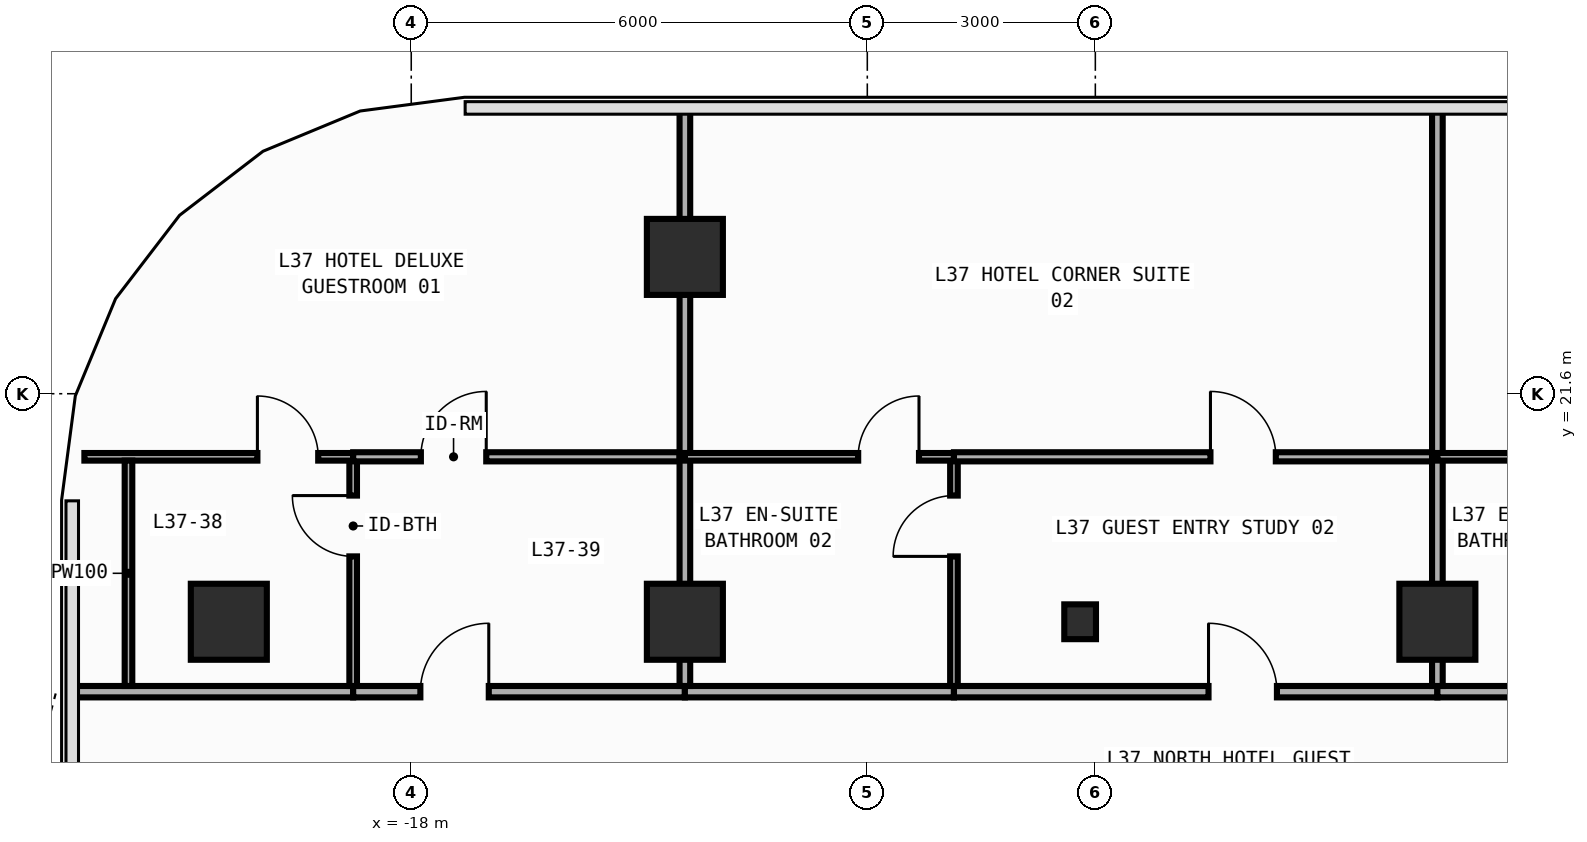
"""IFC4 building model, lengths in metres.
Left out: names, types, materials, properties, quantities, classifications, styles, units other than length and angle.
Written with IfcOpenShell. Run it as: python <this file> out.ifc"""

import sys

from ifc_helpers import new_model, si_unit, direction, frame, frame_2d, origin, origin_2d, place, context, subcontext, project, spatial, rectangle, i_section, extrude, element, fill, save


model = new_model("IFC4")
c1 = context("Model", 3, precision=1e-05, world=origin(), true_north=direction((0.0, 1.0)))
c2 = subcontext(c1, "Body", "Model", "MODEL_VIEW")
j1 = project(units=[si_unit("LENGTHUNIT", "METRE"), si_unit("PLANEANGLEUNIT", "RADIAN")], contexts=[c1])
p1 = place(None, origin())
s1 = spatial("IfcSite", under=j1, at=p1, CompositionType="ELEMENT")
p2 = place(p1, origin())
s2 = spatial("IfcBuilding", under=s1, at=p2, CompositionType="ELEMENT")
p3 = place(p2, frame((0.0, 0.0, 165.0)))
s3 = spatial("IfcBuildingStorey", under=s2, at=p3, CompositionType="ELEMENT", Elevation=165.0)
p4 = place(p3, frame((-9.2, 18.6, 0.0), z_axis=(0.0, 0.0, 1.0), x_axis=(1.0, 0.0, 0.0)))
e1 = element("IfcColumn", 1, at=p4, inside=s3, PredefinedType="COLUMN", context=c2, shape_type="SweptSolid", body=[
    extrude(i_section(OverallWidth=0.417, OverallDepth=0.458, WebThickness=0.03, FlangeThickness=0.05, FilletRadius=0.022, at=origin_2d()), origin(), (0.0, 0.0, 1.0), 3.8),
])
for number, where, z_axis, x_axis in (
    (2, (-20.4, 18.6, 0.0), (0.0, 0.0, 1.0), (1.0, 0.0, 0.0)),
    (3, (-14.4, 18.6, 0.0), (0.0, 0.0, 1.0), (1.0, 0.0, 0.0)),
    (4, (-4.5, 18.6, 0.0), (0.0, 0.0, 1.0), (1.0, 0.0, 0.0)),
    (5, (-14.4, 23.4, 0.0), (0.0, 0.0, 1.0), (1.0, 0.0, 0.0)),
):
    element("IfcColumn", number, at=place(p3, frame(where, z_axis=z_axis, x_axis=x_axis)), inside=s3, PredefinedType="COLUMN", context=c2, shape_type="SweptSolid", body=[
        extrude(rectangle(XDim=1.0, YDim=1.0, at=origin_2d()), origin(), (0.0, 0.0, 1.0), 3.8),
    ])
p5 = place(p3, frame((-22.455, 17.68, 0.0), z_axis=(0.0, 0.0, 1.0), x_axis=(1.0, 0.0, 0.0)))
e6 = element("IfcWall", 6, at=p5, inside=s3, PredefinedType="PARTITIONING", context=c2, shape_type="SweptSolid", body=[
    extrude(rectangle(XDim=3.691, YDim=0.15, at=frame_2d((1.846, 0.0))), origin(), (0.0, 0.0, 1.0), 3.54),
])
p6 = place(p3, frame((-18.764, 17.68, 0.0), z_axis=(0.0, 0.0, 1.0), x_axis=(1.0, 0.0, 0.0)))
e7 = element("IfcWall", 7, at=p6, inside=s3, PredefinedType="PARTITIONING", context=c2, shape_type="SweptSolid", body=[
    extrude(rectangle(XDim=4.364, YDim=0.15, at=frame_2d((2.182, 0.0))), origin(), (0.0, 0.0, 1.0), 3.54),
])
p7 = place(p6, frame((0.884, 0.0, 0.0)))
e8 = element("IfcOpeningElement", 8, at=p7, cuts=e7, PredefinedType="OPENING", context=c2, shape_type="SweptSolid", body=[
    extrude(rectangle(XDim=0.9, YDim=2.15, at=frame_2d((0.45, 1.075))), frame((0.0, 0.085, 0.0), z_axis=(0.0, -1.0, 0.0), x_axis=(1.0, 0.0, 0.0)), (0.0, 0.0, 1.0), 0.17),
])
p8 = place(p3, frame((-14.4, 17.68, 0.0), z_axis=(0.0, 0.0, 1.0), x_axis=(1.0, 0.0, 0.0)))
e9 = element("IfcWall", 9, at=p8, inside=s3, PredefinedType="PARTITIONING", context=c2, shape_type="SweptSolid", body=[
    extrude(rectangle(XDim=3.54, YDim=0.15, at=frame_2d((1.77, 0.0))), origin(), (0.0, 0.0, 1.0), 3.54),
])
p9 = place(p3, frame((-10.86, 17.68, 0.0), z_axis=(0.0, 0.0, 1.0), x_axis=(1.0, 0.0, 0.0)))
e10 = element("IfcWall", 10, at=p9, inside=s3, PredefinedType="PARTITIONING", context=c2, shape_type="SweptSolid", body=[
    extrude(rectangle(XDim=6.36, YDim=0.15, at=frame_2d((3.18, 0.0))), origin(), (0.0, 0.0, 1.0), 3.54),
])
p10 = place(p9, frame((3.349, 0.0, 0.0)))
e11 = element("IfcOpeningElement", 11, at=p10, cuts=e10, PredefinedType="OPENING", context=c2, shape_type="SweptSolid", body=[
    extrude(rectangle(XDim=0.9, YDim=2.15, at=frame_2d((0.45, 1.075))), frame((0.0, 0.085, 0.0), z_axis=(0.0, -1.0, 0.0), x_axis=(1.0, 0.0, 0.0)), (0.0, 0.0, 1.0), 0.17),
])
p11 = place(p3, frame((-4.5, 17.68, 0.0), z_axis=(0.0, 0.0, 1.0), x_axis=(1.0, 0.0, 0.0)))
e12 = element("IfcWall", 12, at=p11, inside=s3, PredefinedType="PARTITIONING", context=c2, shape_type="SweptSolid", body=[
    extrude(rectangle(XDim=3.54, YDim=0.15, at=frame_2d((1.77, 0.0))), origin(), (0.0, 0.0, 1.0), 3.54),
])
p12 = place(p3, frame((-18.764, 17.755, 0.0), z_axis=(0.0, 0.0, 1.0), x_axis=(0.0, 1.0, 0.0)))
e13 = element("IfcWall", 13, at=p12, inside=s3, PredefinedType="PARTITIONING", context=c2, shape_type="SweptSolid", body=[
    extrude(rectangle(XDim=2.965, YDim=0.1, at=frame_2d((1.482, 0.0))), origin(), (0.0, 0.0, 1.0), 3.54),
])
p13 = place(p12, frame((1.705, 0.0, 0.0)))
e14 = element("IfcOpeningElement", 14, at=p13, cuts=e13, PredefinedType="OPENING", context=c2, shape_type="SweptSolid", body=[
    extrude(rectangle(XDim=0.8, YDim=2.1, at=frame_2d((0.4, 1.05))), frame((0.0, 0.06, 0.0), z_axis=(0.0, -1.0, 0.0), x_axis=(1.0, 0.0, 0.0)), (0.0, 0.0, 1.0), 0.12),
])
p14 = place(p3, frame((-22.3, 20.77, 0.0), z_axis=(0.0, 0.0, 1.0), x_axis=(1.0, 0.0, 0.0)))
e15 = element("IfcWall", 15, at=p14, inside=s3, PredefinedType="PARTITIONING", context=c2, shape_type="SweptSolid", body=[
    extrude(rectangle(XDim=3.536, YDim=0.1, at=frame_2d((1.768, 0.0))), origin(), (0.0, 0.0, 1.0), 3.54),
])
p15 = place(p14, frame((2.276, 0.0, 0.0)))
e16 = element("IfcOpeningElement", 16, at=p15, cuts=e15, PredefinedType="OPENING", context=c2, shape_type="SweptSolid", body=[
    extrude(rectangle(XDim=0.8, YDim=2.1, at=frame_2d((0.4, 1.05))), frame((0.0, 0.06, 0.0), z_axis=(0.0, -1.0, 0.0), x_axis=(1.0, 0.0, 0.0)), (0.0, 0.0, 1.0), 0.12),
])
p16 = place(p3, frame((-18.764, 20.77, 0.0), z_axis=(0.0, 0.0, 1.0), x_axis=(1.0, 0.0, 0.0)))
e17 = element("IfcWall", 17, at=p16, inside=s3, PredefinedType="PARTITIONING", context=c2, shape_type="SweptSolid", body=[
    extrude(rectangle(XDim=4.364, YDim=0.12, at=frame_2d((2.182, 0.0))), origin(), (0.0, 0.0, 1.0), 3.54),
])
p17 = place(p16, frame((0.891, 0.0, 0.0)))
e18 = element("IfcOpeningElement", 18, at=p17, cuts=e17, PredefinedType="OPENING", context=c2, shape_type="SweptSolid", body=[
    extrude(rectangle(XDim=0.86, YDim=2.15, at=frame_2d((0.43, 1.075))), frame((0.0, 0.07, 0.0), z_axis=(0.0, -1.0, 0.0), x_axis=(1.0, 0.0, 0.0)), (0.0, 0.0, 1.0), 0.14),
])
p18 = place(p3, frame((-14.4, 17.755, 0.0), z_axis=(0.0, 0.0, 1.0), x_axis=(0.0, 1.0, 0.0)))
e19 = element("IfcWall", 19, at=p18, inside=s3, PredefinedType="PARTITIONING", context=c2, shape_type="SweptSolid", body=[
    extrude(rectangle(XDim=3.015, YDim=0.14, at=frame_2d((1.508, 0.0))), origin(), (0.0, 0.0, 1.0), 2.952),
])
p19 = place(p3, frame((-14.4, 20.77, 0.0), z_axis=(0.0, 0.0, 1.0), x_axis=(0.0, 1.0, 0.0)))
e20 = element("IfcWall", 20, at=p19, inside=s3, PredefinedType="PARTITIONING", context=c2, shape_type="SweptSolid", body=[
    extrude(rectangle(XDim=4.585, YDim=0.14, at=frame_2d((2.292, 0.0))), origin(), (0.0, 0.0, 1.0), 2.952),
])
p20 = place(p3, frame((-10.86, 17.755, 0.0), z_axis=(0.0, 0.0, 1.0), x_axis=(0.0, 1.0, 0.0)))
e21 = element("IfcWall", 21, at=p20, inside=s3, PredefinedType="PARTITIONING", context=c2, shape_type="SweptSolid", body=[
    extrude(rectangle(XDim=2.965, YDim=0.1, at=frame_2d((1.482, 0.0))), origin(), (0.0, 0.0, 1.0), 3.54),
])
p21 = place(p20, frame((1.705, 0.0, 0.0)))
e22 = element("IfcOpeningElement", 22, at=p21, cuts=e21, PredefinedType="OPENING", context=c2, shape_type="SweptSolid", body=[
    extrude(rectangle(XDim=0.8, YDim=2.1, at=frame_2d((0.4, 1.05))), frame((0.0, 0.06, 0.0), z_axis=(0.0, -1.0, 0.0), x_axis=(1.0, 0.0, 0.0)), (0.0, 0.0, 1.0), 0.12),
])
p22 = place(p3, frame((-14.4, 20.77, 0.0), z_axis=(0.0, 0.0, 1.0), x_axis=(1.0, 0.0, 0.0)))
e23 = element("IfcWall", 23, at=p22, inside=s3, PredefinedType="PARTITIONING", context=c2, shape_type="SweptSolid", body=[
    extrude(rectangle(XDim=3.54, YDim=0.1, at=frame_2d((1.77, 0.0))), origin(), (0.0, 0.0, 1.0), 3.54),
])
p23 = place(p22, frame((2.28, 0.0, 0.0)))
e24 = element("IfcOpeningElement", 24, at=p23, cuts=e23, PredefinedType="OPENING", context=c2, shape_type="SweptSolid", body=[
    extrude(rectangle(XDim=0.8, YDim=2.1, at=frame_2d((0.4, 1.05))), frame((0.0, 0.06, 0.0), z_axis=(0.0, -1.0, 0.0), x_axis=(1.0, 0.0, 0.0)), (0.0, 0.0, 1.0), 0.12),
])
p24 = place(p3, frame((-10.86, 20.77, 0.0), z_axis=(0.0, 0.0, 1.0), x_axis=(1.0, 0.0, 0.0)))
e25 = element("IfcWall", 25, at=p24, inside=s3, PredefinedType="PARTITIONING", context=c2, shape_type="SweptSolid", body=[
    extrude(rectangle(XDim=6.36, YDim=0.12, at=frame_2d((3.18, 0.0))), origin(), (0.0, 0.0, 1.0), 3.54),
])
p25 = place(p24, frame((3.375, 0.0, 0.0)))
e26 = element("IfcOpeningElement", 26, at=p25, cuts=e25, PredefinedType="OPENING", context=c2, shape_type="SweptSolid", body=[
    extrude(rectangle(XDim=0.86, YDim=2.15, at=frame_2d((0.43, 1.075))), frame((0.0, 0.07, 0.0), z_axis=(0.0, -1.0, 0.0), x_axis=(1.0, 0.0, 0.0)), (0.0, 0.0, 1.0), 0.14),
])
p26 = place(p3, frame((-4.5, 17.755, 0.0), z_axis=(0.0, 0.0, 1.0), x_axis=(0.0, 1.0, 0.0)))
e27 = element("IfcWall", 27, at=p26, inside=s3, PredefinedType="PARTITIONING", context=c2, shape_type="SweptSolid", body=[
    extrude(rectangle(XDim=3.015, YDim=0.14, at=frame_2d((1.508, 0.0))), origin(), (0.0, 0.0, 1.0), 3.54),
])
p27 = place(p3, frame((-4.5, 20.77, 0.0), z_axis=(0.0, 0.0, 1.0), x_axis=(0.0, 1.0, 0.0)))
e28 = element("IfcWall", 28, at=p27, inside=s3, PredefinedType="PARTITIONING", context=c2, shape_type="SweptSolid", body=[
    extrude(rectangle(XDim=4.585, YDim=0.14, at=frame_2d((2.292, 0.0))), origin(), (0.0, 0.0, 1.0), 3.54),
])
p28 = place(p3, frame((-4.5, 20.77, 0.0), z_axis=(0.0, 0.0, 1.0), x_axis=(1.0, 0.0, 0.0)))
e29 = element("IfcWall", 29, at=p28, inside=s3, PredefinedType="PARTITIONING", context=c2, shape_type="SweptSolid", body=[
    extrude(rectangle(XDim=3.54, YDim=0.1, at=frame_2d((1.77, 0.0))), origin(), (0.0, 0.0, 1.0), 3.54),
])
p29 = place(p28, frame((1.875, 0.0, 0.0)))
e30 = element("IfcOpeningElement", 30, at=p29, cuts=e29, PredefinedType="OPENING", context=c2, shape_type="SweptSolid", body=[
    extrude(rectangle(XDim=0.8, YDim=2.1, at=frame_2d((0.4, 1.05))), frame((0.0, 0.06, 0.0), z_axis=(0.0, -1.0, 0.0), x_axis=(1.0, 0.0, 0.0)), (0.0, 0.0, 1.0), 0.12),
])
p30 = place(p3, frame((-21.72, 17.755, 0.0), z_axis=(0.0, 0.0, 1.0), x_axis=(0.0, 1.0, 0.0)))
e31 = element("IfcWall", 31, at=p30, inside=s3, PredefinedType="PARTITIONING", context=c2, shape_type="SweptSolid", body=[
    extrude(rectangle(XDim=2.965, YDim=0.1, at=frame_2d((1.482, 0.0))), origin(), (0.0, 0.0, 1.0), 3.54),
])
p31 = place(p7, origin())
e32 = element("IfcDoor", 32, at=p31, inside=s3, OperationType="SINGLE_SWING_RIGHT", PredefinedType="DOOR", context=c2, shape_type="SweptSolid", body=[
    extrude(rectangle(XDim=0.9, YDim=2.15, at=frame_2d((0.45, 1.075))), frame((0.0, 0.025, 0.0), z_axis=(0.0, -1.0, 0.0), x_axis=(1.0, 0.0, 0.0)), (0.0, 0.0, 1.0), 0.05),
])
fill(e8, e32)
p32 = place(p10, origin())
e33 = element("IfcDoor", 33, at=p32, inside=s3, OperationType="SINGLE_SWING_LEFT", PredefinedType="DOOR", context=c2, shape_type="SweptSolid", body=[
    extrude(rectangle(XDim=0.9, YDim=2.15, at=frame_2d((0.45, 1.075))), frame((0.0, 0.025, 0.0), z_axis=(0.0, -1.0, 0.0), x_axis=(1.0, 0.0, 0.0)), (0.0, 0.0, 1.0), 0.05),
])
fill(e11, e33)
p33 = place(p13, origin())
e34 = element("IfcDoor", 34, at=p33, inside=s3, OperationType="SINGLE_SWING_RIGHT", PredefinedType="DOOR", context=c2, shape_type="SweptSolid", body=[
    extrude(rectangle(XDim=0.8, YDim=2.1, at=frame_2d((0.4, 1.05))), frame((0.0, 0.025, 0.0), z_axis=(0.0, -1.0, 0.0), x_axis=(1.0, 0.0, 0.0)), (0.0, 0.0, 1.0), 0.05),
])
fill(e14, e34)
p34 = place(p15, origin())
e35 = element("IfcDoor", 35, at=p34, inside=s3, OperationType="SINGLE_SWING_LEFT", PredefinedType="DOOR", context=c2, shape_type="SweptSolid", body=[
    extrude(rectangle(XDim=0.8, YDim=2.1, at=frame_2d((0.4, 1.05))), frame((0.0, 0.025, 0.0), z_axis=(0.0, -1.0, 0.0), x_axis=(1.0, 0.0, 0.0)), (0.0, 0.0, 1.0), 0.05),
])
fill(e16, e35)
p35 = place(p17, origin())
e36 = element("IfcDoor", 36, at=p35, inside=s3, OperationType="SINGLE_SWING_RIGHT", PredefinedType="DOOR", context=c2, shape_type="SweptSolid", body=[
    extrude(rectangle(XDim=0.86, YDim=2.15, at=frame_2d((0.43, 1.075))), frame((0.0, 0.025, 0.0), z_axis=(0.0, -1.0, 0.0), x_axis=(1.0, 0.0, 0.0)), (0.0, 0.0, 1.0), 0.05),
])
fill(e18, e36)
p36 = place(p21, origin())
e37 = element("IfcDoor", 37, at=p36, inside=s3, OperationType="SINGLE_SWING_LEFT", PredefinedType="DOOR", context=c2, shape_type="SweptSolid", body=[
    extrude(rectangle(XDim=0.8, YDim=2.1, at=frame_2d((0.4, 1.05))), frame((0.0, 0.025, 0.0), z_axis=(0.0, -1.0, 0.0), x_axis=(1.0, 0.0, 0.0)), (0.0, 0.0, 1.0), 0.05),
])
fill(e22, e37)
p37 = place(p23, origin())
e38 = element("IfcDoor", 38, at=p37, inside=s3, OperationType="SINGLE_SWING_RIGHT", PredefinedType="DOOR", context=c2, shape_type="SweptSolid", body=[
    extrude(rectangle(XDim=0.8, YDim=2.1, at=frame_2d((0.4, 1.05))), frame((0.0, 0.025, 0.0), z_axis=(0.0, -1.0, 0.0), x_axis=(1.0, 0.0, 0.0)), (0.0, 0.0, 1.0), 0.05),
])
fill(e24, e38)
p38 = place(p25, origin())
e39 = element("IfcDoor", 39, at=p38, inside=s3, OperationType="SINGLE_SWING_LEFT", PredefinedType="DOOR", context=c2, shape_type="SweptSolid", body=[
    extrude(rectangle(XDim=0.86, YDim=2.15, at=frame_2d((0.43, 1.075))), frame((0.0, 0.025, 0.0), z_axis=(0.0, -1.0, 0.0), x_axis=(1.0, 0.0, 0.0)), (0.0, 0.0, 1.0), 0.05),
])
fill(e26, e39)
save(model, sys.argv[1])
